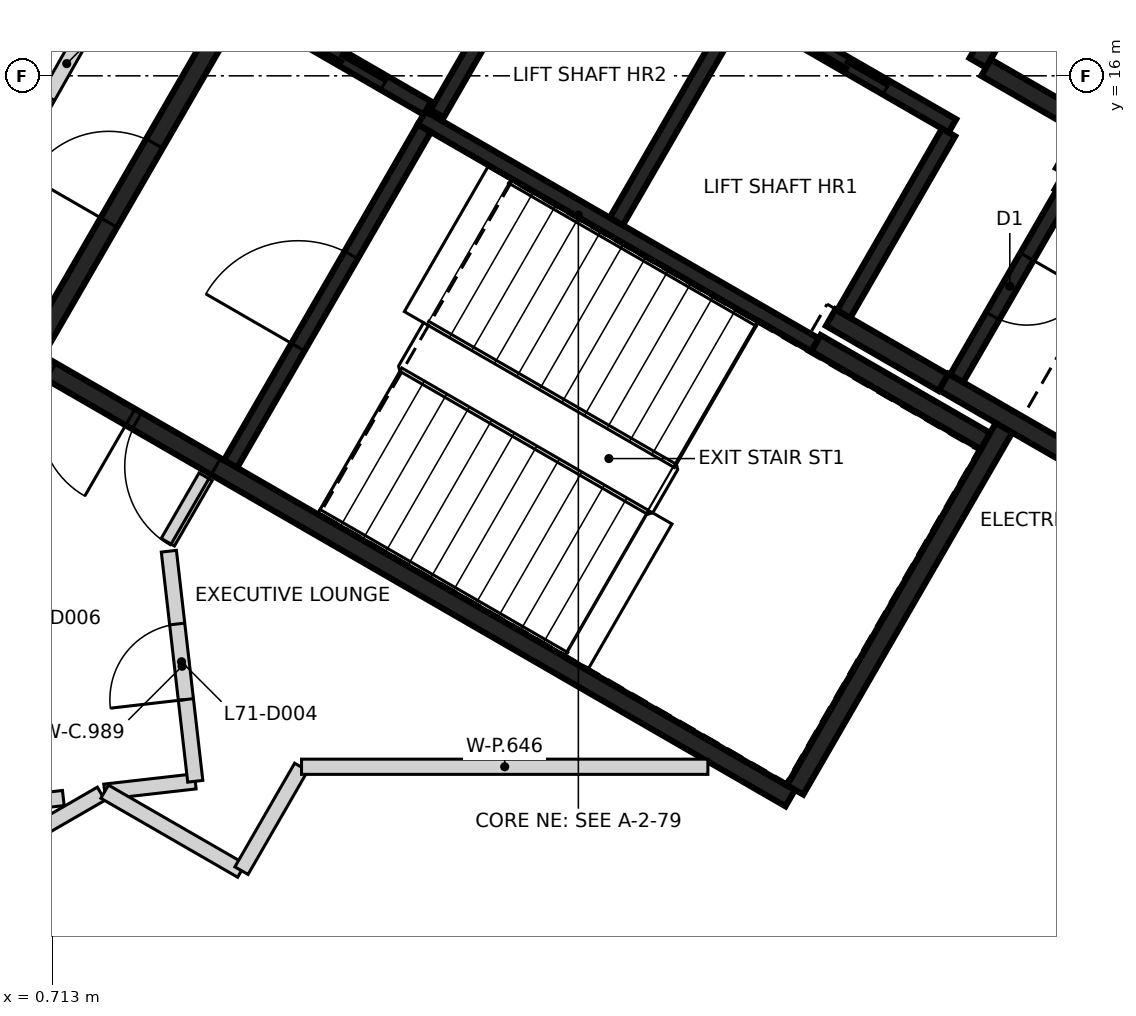
"""IFC4 building model, lengths in metres.
Left out: names, types, materials, properties, quantities, classifications, styles, units other than length and angle.
Written with IfcOpenShell. Run it as: python <this file> out.ifc"""

import sys

from ifc_helpers import new_model, si_unit, direction, frame, frame_2d, origin, place, context, subcontext, project, spatial, rectangle, extrude, element, fill, save


model = new_model("IFC4")
c1 = context("Model", 3, precision=1e-05, world=origin(), true_north=direction((0.0, 1.0)))
c2 = subcontext(c1, "Body", "Model", "MODEL_VIEW")
j1 = project(units=[si_unit("LENGTHUNIT", "METRE"), si_unit("PLANEANGLEUNIT", "RADIAN")], contexts=[c1])
p1 = place(None, origin())
s1 = spatial("IfcSite", under=j1, at=p1, CompositionType="ELEMENT")
p2 = place(p1, origin())
s2 = spatial("IfcBuilding", under=s1, at=p2, CompositionType="ELEMENT")
p3 = place(p2, frame((0.0, 0.0, 280.2)))
s3 = spatial("IfcBuildingStorey", under=s2, at=p3, CompositionType="ELEMENT", Elevation=280.2)
p4 = place(p3, frame((10.42, 6.498, 0.0), z_axis=(0.0, 0.0, 1.0), x_axis=(-0.866021906294, 0.500006057782, 0.0)))
e1 = element("IfcWall", 1, at=p4, inside=s3, PredefinedType="SHEAR", context=c2, shape_type="SweptSolid", body=[
    extrude(rectangle(XDim=11.55, YDim=0.25, at=frame_2d((5.775, 0.0))), origin(), (0.0, 0.0, 1.0), 3.25),
])
p5 = place(p4, frame((10.025, 0.0, 0.0)))
e2 = element("IfcOpeningElement", 2, at=p5, cuts=e1, PredefinedType="OPENING", context=c2, shape_type="SweptSolid", body=[
    extrude(rectangle(XDim=1.2, YDim=2.1, at=frame_2d((0.6, 1.05))), frame((0.0, 0.135, 0.0), z_axis=(0.0, -1.0, 0.0), x_axis=(1.0, 0.0, 0.0)), (0.0, 0.0, 1.0), 0.27),
])
p6 = place(p4, frame((8.725, 0.0, 0.0)))
e3 = element("IfcOpeningElement", 3, at=p6, cuts=e1, PredefinedType="OPENING", context=c2, shape_type="SweptSolid", body=[
    extrude(rectangle(XDim=1.2, YDim=2.1, at=frame_2d((0.6, 1.05))), frame((0.0, 0.135, 0.0), z_axis=(0.0, -1.0, 0.0), x_axis=(1.0, 0.0, 0.0)), (0.0, 0.0, 1.0), 0.27),
])
p7 = place(p3, frame((0.48, 12.381, 0.0), z_axis=(0.0, 0.0, 1.0), x_axis=(0.49999885962, 0.866026062182, 0.0)))
e4 = element("IfcWall", 4, at=p7, inside=s3, PredefinedType="SHEAR", context=c2, shape_type="SweptSolid", body=[
    extrude(rectangle(XDim=5.225, YDim=0.25, at=frame_2d((2.612, 0.0))), origin(), (0.0, 0.0, 1.0), 3.25),
])
p8 = place(p7, frame((1.95, 0.0, 0.0)))
e5 = element("IfcOpeningElement", 5, at=p8, cuts=e4, PredefinedType="OPENING", context=c2, shape_type="SweptSolid", body=[
    extrude(rectangle(XDim=1.2, YDim=2.1, at=frame_2d((0.6, 1.05))), frame((0.0, 0.135, 0.0), z_axis=(0.0, -1.0, 0.0), x_axis=(1.0, 0.0, 0.0)), (0.0, 0.0, 1.0), 0.27),
])
p9 = place(p3, frame((13.238, 11.378, 0.0), z_axis=(0.0, 0.0, 1.0), x_axis=(-0.500008851346, -0.866020293397, 0.0)))
e6 = element("IfcWall", 6, at=p9, inside=s3, PredefinedType="SHEAR", context=c2, shape_type="SweptSolid", body=[
    extrude(rectangle(XDim=5.51, YDim=0.25, at=frame_2d((2.755, 0.0))), origin(), (0.0, 0.0, 1.0), 3.25),
])
p10 = place(p3, frame((14.918, 10.54, 0.0), z_axis=(0.0, 0.0, 1.0), x_axis=(-0.866063538972, 0.499933942099, 0.0)))
e7 = element("IfcWall", 7, at=p10, inside=s3, PredefinedType="SHEAR", context=c2, shape_type="SweptSolid", body=[
    extrude(rectangle(XDim=2.865, YDim=0.25, at=frame_2d((1.432, 0.0))), origin(), (0.0, 0.0, 1.0), 3.25),
])
p11 = place(p3, frame((13.963, 14.614, 0.0), z_axis=(0.0, 0.0, 1.0), x_axis=(0.866042235819, -0.499970844928, 0.0)))
e8 = element("IfcWall", 8, at=p11, inside=s3, PredefinedType="SHEAR", context=c2, shape_type="SweptSolid", body=[
    extrude(rectangle(XDim=2.865, YDim=0.25, at=frame_2d((1.432, 0.0))), origin(), (0.0, 0.0, 1.0), 3.25),
])
p12 = place(p3, frame((10.757, 12.481, 0.0), z_axis=(0.0, 0.0, 1.0), x_axis=(0.866022940537, -0.500004266446, 0.0)))
e9 = element("IfcWall", 9, at=p12, inside=s3, PredefinedType="SHEAR", context=c2, shape_type="SweptSolid", body=[
    extrude(rectangle(XDim=2.575, YDim=0.25, at=frame_2d((1.287, 0.0))), origin(), (0.0, 0.0, 1.0), 3.25),
])
p13 = place(p3, frame((13.819, 17.785, 0.0), z_axis=(0.0, 0.0, 1.0), x_axis=(-0.500039802285, -0.866002422705, 0.0)))
e10 = element("IfcWall", 10, at=p13, inside=s3, PredefinedType="SHEAR", context=c2, shape_type="SweptSolid", body=[
    extrude(rectangle(XDim=1.865, YDim=0.25, at=frame_2d((0.932, 0.0))), origin(), (0.0, 0.0, 1.0), 3.25),
])
p14 = place(p3, frame((12.433, 11.964, 0.0), z_axis=(0.0, 0.0, 1.0), x_axis=(-0.866038183914, 0.499977863513, 0.0)))
e11 = element("IfcWall", 11, at=p14, inside=s3, PredefinedType="SHEAR", context=c2, shape_type="SweptSolid", body=[
    extrude(rectangle(XDim=1.71, YDim=0.25, at=frame_2d((0.855, 0.0))), origin(), (0.0, 0.0, 1.0), 3.25),
])
p15 = place(p3, frame((12.995, 16.108, 0.0), z_axis=(0.0, 0.0, 1.0), x_axis=(0.866044474677, -0.49996696679, 0.0)))
e12 = element("IfcWall", 12, at=p15, inside=s3, PredefinedType="SHEAR", context=c2, shape_type="SweptSolid", body=[
    extrude(rectangle(XDim=1.584, YDim=0.25, at=frame_2d((0.792, 0.0))), origin(), (0.0, 0.0, 1.0), 3.25),
])
p16 = place(p3, frame((14.305, 15.207, 0.0), z_axis=(0.0, 0.0, 1.0), x_axis=(-0.499848422343, -0.866112899501, 0.0)))
e13 = element("IfcWall", 13, at=p16, inside=s3, PredefinedType="SHEAR", context=c2, shape_type="SweptSolid", body=[
    extrude(rectangle(XDim=0.559, YDim=0.25, at=frame_2d((0.28, 0.0))), origin(), (0.0, 0.0, 1.0), 3.25),
])
p17 = place(p3, frame((12.552, 15.342, 0.0), z_axis=(0.0, 0.0, 1.0), x_axis=(-0.866030299012, 0.499991521122, 0.0)))
e14 = element("IfcWall", 14, at=p17, inside=s3, PredefinedType="SHEAR", context=c2, shape_type="SweptSolid", body=[
    extrude(rectangle(XDim=6.1, YDim=0.2, at=frame_2d((3.05, 0.0))), origin(), (0.0, 0.0, 1.0), 3.25),
])
p18 = place(p17, frame((1.0, 0.0, 0.0)))
e15 = element("IfcOpeningElement", 15, at=p18, cuts=e14, PredefinedType="OPENING", context=c2, shape_type="SweptSolid", body=[
    extrude(rectangle(XDim=1.2, YDim=2.1, at=frame_2d((0.6, 1.05))), frame((0.0, 0.11, 0.0), z_axis=(0.0, -1.0, 0.0), x_axis=(1.0, 0.0, 0.0)), (0.0, 0.0, 1.0), 0.22),
])
p19 = place(p17, frame((3.982, 0.0, 0.0)))
e16 = element("IfcOpeningElement", 16, at=p19, cuts=e14, PredefinedType="OPENING", context=c2, shape_type="SweptSolid", body=[
    extrude(rectangle(XDim=1.2, YDim=2.1, at=frame_2d((0.6, 1.05))), frame((0.0, 0.11, 0.0), z_axis=(0.0, -1.0, 0.0), x_axis=(1.0, 0.0, 0.0)), (0.0, 0.0, 1.0), 0.22),
])
p20 = place(p3, frame((10.743, 12.46, 0.0), z_axis=(0.0, 0.0, 1.0), x_axis=(-0.866018848283, 0.500011354289, 0.0)))
e17 = element("IfcWall", 17, at=p20, inside=s3, PredefinedType="SHEAR", context=c2, shape_type="SweptSolid", body=[
    extrude(rectangle(XDim=5.974, YDim=0.2, at=frame_2d((2.987, 0.0))), origin(), (0.0, 0.0, 1.0), 3.25),
])
p21 = place(p3, frame((3.057, 10.895, 0.0), z_axis=(0.0, 0.0, 1.0), x_axis=(0.500027839223, 0.866009330205, 0.0)))
e18 = element("IfcWall", 18, at=p21, inside=s3, PredefinedType="SHEAR", context=c2, shape_type="SweptSolid", body=[
    extrude(rectangle(XDim=5.098, YDim=0.2, at=frame_2d((2.549, 0.0))), origin(), (0.0, 0.0, 1.0), 3.25),
])
p22 = place(p21, frame((1.774, 0.0, 0.0)))
e19 = element("IfcOpeningElement", 19, at=p22, cuts=e18, PredefinedType="OPENING", context=c2, shape_type="SweptSolid", body=[
    extrude(rectangle(XDim=1.4, YDim=2.1, at=frame_2d((0.7, 1.05))), frame((0.0, 0.11, 0.0), z_axis=(0.0, -1.0, 0.0), x_axis=(1.0, 0.0, 0.0)), (0.0, 0.0, 1.0), 0.22),
])
p23 = place(p3, frame((8.132, 14.084, 0.0), z_axis=(0.0, 0.0, 1.0), x_axis=(0.500030834389, 0.86600760081, 0.0)))
e20 = element("IfcWall", 20, at=p23, inside=s3, PredefinedType="SHEAR", context=c2, shape_type="SweptSolid", body=[
    extrude(rectangle(XDim=3.198, YDim=0.2, at=frame_2d((1.599, 0.0))), origin(), (0.0, 0.0, 1.0), 3.25),
])
p24 = place(p3, frame((14.008, 14.442, 0.0), z_axis=(0.0, 0.0, 1.0), x_axis=(-0.499986818241, -0.866033014143, 0.0)))
e21 = element("IfcWall", 21, at=p24, inside=s3, PredefinedType="SHEAR", context=c2, shape_type="SweptSolid", body=[
    extrude(rectangle(XDim=2.798, YDim=0.2, at=frame_2d((1.399, 0.0))), origin(), (0.0, 0.0, 1.0), 3.25),
])
p25 = place(p24, frame((0.949, 0.0, 0.0)))
e22 = element("IfcOpeningElement", 22, at=p25, cuts=e21, PredefinedType="OPENING", context=c2, shape_type="SweptSolid", body=[
    extrude(rectangle(XDim=0.9, YDim=2.1, at=frame_2d((0.45, 1.05))), frame((0.0, 0.11, 0.0), z_axis=(0.0, -1.0, 0.0), x_axis=(1.0, 0.0, 0.0)), (0.0, 0.0, 1.0), 0.22),
])
p26 = place(p3, frame((12.502, 15.255, 0.0), z_axis=(0.0, 0.0, 1.0), x_axis=(-0.499965018551, -0.866045599391, 0.0)))
e23 = element("IfcWall", 23, at=p26, inside=s3, PredefinedType="SHEAR", context=c2, shape_type="SweptSolid", body=[
    extrude(rectangle(XDim=2.759, YDim=0.2, at=frame_2d((1.379, 0.0))), origin(), (0.0, 0.0, 1.0), 3.25),
])
p27 = place(p3, frame((7.324, 18.187, 0.0), z_axis=(0.0, 0.0, 1.0), x_axis=(-0.499967891604, -0.866043940782, 0.0)))
e24 = element("IfcWall", 24, at=p27, inside=s3, PredefinedType="SHEAR", context=c2, shape_type="SweptSolid", body=[
    extrude(rectangle(XDim=3.1, YDim=0.2, at=frame_2d((1.55, 0.0))), origin(), (0.0, 0.0, 1.0), 3.25),
])
p28 = place(p3, frame((5.646, 15.576, 0.0), z_axis=(0.0, 0.0, 1.0), x_axis=(-0.866018407898, 0.500012117035, 0.0)))
e25 = element("IfcWall", 25, at=p28, inside=s3, PredefinedType="SHEAR", context=c2, shape_type="SweptSolid", body=[
    extrude(rectangle(XDim=2.651, YDim=0.2, at=frame_2d((1.325, 0.0))), origin(), (0.0, 0.0, 1.0), 3.25),
])
p29 = place(p28, frame((0.652, 0.0, 0.0)))
e26 = element("IfcOpeningElement", 26, at=p29, cuts=e25, PredefinedType="OPENING", context=c2, shape_type="SweptSolid", body=[
    extrude(rectangle(XDim=1.3, YDim=2.1, at=frame_2d((0.65, 1.05))), frame((0.0, 0.11, 0.0), z_axis=(0.0, -1.0, 0.0), x_axis=(1.0, 0.0, 0.0)), (0.0, 0.0, 1.0), 0.22),
])
p30 = place(p3, frame((-6.4, 2.079, 0.0), z_axis=(0.0, 0.0, 1.0), x_axis=(0.866044821263, 0.499966366432, 0.0)))
e27 = element("IfcWall", 27, at=p30, inside=s3, PredefinedType="PARTITIONING", context=c2, shape_type="SweptSolid", body=[
    extrude(rectangle(XDim=8.953, YDim=0.2, at=frame_2d((4.477, 0.0))), origin(), (0.0, 0.0, 1.0), 3.25),
])
p31 = place(p30, frame((4.003, 0.0, 0.0)))
e28 = element("IfcOpeningElement", 28, at=p31, cuts=e27, PredefinedType="OPENING", context=c2, shape_type="SweptSolid", body=[
    extrude(rectangle(XDim=1.0, YDim=2.1, at=frame_2d((0.5, 1.05))), frame((0.0, 0.11, 0.0), z_axis=(0.0, -1.0, 0.0), x_axis=(1.0, 0.0, 0.0)), (0.0, 0.0, 1.0), 0.22),
])
p32 = place(p3, frame((-1.086, 12.65, 0.0), z_axis=(0.0, 0.0, 1.0), x_axis=(0.492563383526, 0.870276572826, 0.0)))
e29 = element("IfcWall", 29, at=p32, inside=s3, PredefinedType="PARTITIONING", context=c2, shape_type="SweptSolid", body=[
    extrude(rectangle(XDim=6.309, YDim=0.2, at=frame_2d((3.155, 0.0))), origin(), (0.0, 0.0, 1.0), 3.25),
])
p33 = place(p32, frame((3.533, 0.0, 0.0)))
e30 = element("IfcOpeningElement", 30, at=p33, cuts=e29, PredefinedType="OPENING", context=c2, shape_type="SweptSolid", body=[
    extrude(rectangle(XDim=1.0, YDim=2.1, at=frame_2d((0.5, 1.05))), frame((0.0, 0.11, 0.0), z_axis=(0.0, -1.0, 0.0), x_axis=(1.0, 0.0, 0.0)), (0.0, 0.0, 1.0), 0.22),
])
p34 = place(p3, frame((0.286, 6.434, 0.0), z_axis=(0.0, 0.0, 1.0), x_axis=(0.993674480486, 0.112298828274, 0.0)))
e31 = element("IfcWall", 31, at=p34, inside=s3, PredefinedType="PARTITIONING", context=c2, shape_type="SweptSolid", body=[
    extrude(rectangle(XDim=0.574, YDim=0.2, at=frame_2d((0.287, 0.0))), origin(), (0.0, 0.0, 1.0), 3.25),
])
p35 = place(p3, frame((1.4, 6.582, 0.0), z_axis=(0.0, 0.0, 1.0), x_axis=(0.993556915844, 0.11333426216, 0.0)))
e32 = element("IfcWall", 32, at=p35, inside=s3, PredefinedType="PARTITIONING", context=c2, shape_type="SweptSolid", body=[
    extrude(rectangle(XDim=1.2, YDim=0.2, at=frame_2d((0.6, 0.0))), origin(), (0.0, 0.0, 1.0), 3.25),
])
p36 = place(p3, frame((1.4, 6.582, 0.0), z_axis=(0.0, 0.0, 1.0), x_axis=(0.866066271601, -0.499929208183, 0.0)))
e33 = element("IfcWall", 33, at=p36, inside=s3, PredefinedType="PARTITIONING", context=c2, shape_type="SweptSolid", body=[
    extrude(rectangle(XDim=2.078, YDim=0.2, at=frame_2d((1.039, 0.0))), origin(), (0.0, 0.0, 1.0), 3.25),
])
p37 = place(p3, frame((2.592, 6.719, 0.0), z_axis=(0.0, 0.0, 1.0), x_axis=(-0.114027951455, 0.993477541914, 0.0)))
e34 = element("IfcWall", 34, at=p37, inside=s3, PredefinedType="PARTITIONING", context=c2, shape_type="SweptSolid", body=[
    extrude(rectangle(XDim=3.047, YDim=0.2, at=frame_2d((1.523, 0.0))), origin(), (0.0, 0.0, 1.0), 3.25),
])
p38 = place(p37, frame((1.083, 0.0, 0.0)))
e35 = element("IfcOpeningElement", 35, at=p38, cuts=e34, PredefinedType="OPENING", context=c2, shape_type="SweptSolid", body=[
    extrude(rectangle(XDim=1.0, YDim=2.1, at=frame_2d((0.5, 1.05))), frame((0.0, 0.11, 0.0), z_axis=(0.0, -1.0, 0.0), x_axis=(1.0, 0.0, 0.0)), (0.0, 0.0, 1.0), 0.22),
])
p39 = place(p3, frame((2.231, 9.864, 0.0), z_axis=(0.0, 0.0, 1.0), x_axis=(0.499942098031, 0.866058830921, 0.0)))
e36 = element("IfcWall", 36, at=p39, inside=s3, PredefinedType="PARTITIONING", context=c2, shape_type="SweptSolid", body=[
    extrude(rectangle(XDim=0.994, YDim=0.2, at=frame_2d((0.497, 0.0))), origin(), (0.0, 0.0, 1.0), 3.25),
])
p40 = place(p3, frame((3.2, 5.543, 0.0), z_axis=(0.0, 0.0, 1.0), x_axis=(0.499342032259, 0.86640494852, 0.0)))
e37 = element("IfcWall", 37, at=p40, inside=s3, PredefinedType="PARTITIONING", context=c2, shape_type="SweptSolid", body=[
    extrude(rectangle(XDim=1.574, YDim=0.2, at=frame_2d((0.787, 0.0))), origin(), (0.0, 0.0, 1.0), 3.25),
])
p41 = place(p3, frame((3.99, 6.91, 0.0), z_axis=(0.0, 0.0, 1.0), x_axis=(1.0, 0.0, 0.0)))
e38 = element("IfcWall", 38, at=p41, inside=s3, PredefinedType="PARTITIONING", context=c2, shape_type="SweptSolid", body=[
    extrude(rectangle(XDim=5.346, YDim=0.2, at=frame_2d((2.673, 0.0))), origin(), (0.0, 0.0, 1.0), 3.25),
])
p42 = place(p29, origin())
e39 = element("IfcDoor", 39, at=p42, inside=s3, OperationType="SLIDING_TO_LEFT", PredefinedType="DOOR", context=c2, shape_type="SweptSolid", body=[
    extrude(rectangle(XDim=1.3, YDim=2.1, at=frame_2d((0.65, 1.05))), frame((0.0, 0.025, 0.0), z_axis=(0.0, -1.0, 0.0), x_axis=(1.0, 0.0, 0.0)), (0.0, 0.0, 1.0), 0.05),
])
fill(e26, e39)
p43 = place(p18, origin())
e40 = element("IfcDoor", 40, at=p43, inside=s3, OperationType="DOUBLE_DOOR_SLIDING", PredefinedType="DOOR", context=c2, shape_type="SweptSolid", body=[
    extrude(rectangle(XDim=1.2, YDim=2.1, at=frame_2d((0.6, 1.05))), frame((0.0, 0.025, 0.0), z_axis=(0.0, -1.0, 0.0), x_axis=(1.0, 0.0, 0.0)), (0.0, 0.0, 1.0), 0.05),
])
fill(e15, e40)
p44 = place(p5, origin())
e41 = element("IfcDoor", 41, at=p44, inside=s3, OperationType="SINGLE_SWING_LEFT", PredefinedType="DOOR", context=c2, shape_type="SweptSolid", body=[
    extrude(rectangle(XDim=1.2, YDim=2.1, at=frame_2d((0.6, 1.05))), frame((0.0, 0.025, 0.0), z_axis=(0.0, -1.0, 0.0), x_axis=(1.0, 0.0, 0.0)), (0.0, 0.0, 1.0), 0.05),
])
fill(e2, e41)
p45 = place(p6, origin())
e42 = element("IfcDoor", 42, at=p45, inside=s3, OperationType="SINGLE_SWING_RIGHT", PredefinedType="DOOR", context=c2, shape_type="SweptSolid", body=[
    extrude(rectangle(XDim=1.2, YDim=2.1, at=frame_2d((0.6, 1.05))), frame((0.0, 0.025, 0.0), z_axis=(0.0, -1.0, 0.0), x_axis=(1.0, 0.0, 0.0)), (0.0, 0.0, 1.0), 0.05),
])
fill(e3, e42)
p46 = place(p22, origin())
e43 = element("IfcDoor", 43, at=p46, inside=s3, OperationType="SINGLE_SWING_LEFT", PredefinedType="DOOR", context=c2, shape_type="SweptSolid", body=[
    extrude(rectangle(XDim=1.4, YDim=2.1, at=frame_2d((0.7, 1.05))), frame((0.0, 0.025, 0.0), z_axis=(0.0, -1.0, 0.0), x_axis=(1.0, 0.0, 0.0)), (0.0, 0.0, 1.0), 0.05),
])
fill(e19, e43)
p47 = place(p25, origin())
e44 = element("IfcDoor", 44, at=p47, inside=s3, OperationType="SINGLE_SWING_RIGHT", PredefinedType="DOOR", context=c2, shape_type="SweptSolid", body=[
    extrude(rectangle(XDim=0.9, YDim=2.1, at=frame_2d((0.45, 1.05))), frame((0.0, 0.025, 0.0), z_axis=(0.0, -1.0, 0.0), x_axis=(1.0, 0.0, 0.0)), (0.0, 0.0, 1.0), 0.05),
])
fill(e22, e44)
p48 = place(p8, origin())
e45 = element("IfcDoor", 45, at=p48, inside=s3, OperationType="SINGLE_SWING_RIGHT", PredefinedType="DOOR", context=c2, shape_type="SweptSolid", body=[
    extrude(rectangle(XDim=1.2, YDim=2.1, at=frame_2d((0.6, 1.05))), frame((0.0, 0.025, 0.0), z_axis=(0.0, -1.0, 0.0), x_axis=(1.0, 0.0, 0.0)), (0.0, 0.0, 1.0), 0.05),
])
fill(e5, e45)
p49 = place(p38, origin())
e46 = element("IfcDoor", 46, at=p49, inside=s3, OperationType="SINGLE_SWING_LEFT", PredefinedType="DOOR", context=c2, shape_type="SweptSolid", body=[
    extrude(rectangle(XDim=1.0, YDim=2.1, at=frame_2d((0.5, 1.05))), frame((0.0, 0.025, 0.0), z_axis=(0.0, -1.0, 0.0), x_axis=(1.0, 0.0, 0.0)), (0.0, 0.0, 1.0), 0.05),
])
fill(e35, e46)
p50 = place(p33, frame((1.0, 0.0, 0.0), z_axis=(0.0, 0.0, 1.0), x_axis=(-1.0, 0.0, 0.0)))
e47 = element("IfcDoor", 47, at=p50, inside=s3, OperationType="SINGLE_SWING_LEFT", PredefinedType="DOOR", context=c2, shape_type="SweptSolid", body=[
    extrude(rectangle(XDim=1.0, YDim=2.1, at=frame_2d((0.5, 1.05))), frame((0.0, 0.025, 0.0), z_axis=(0.0, -1.0, 0.0), x_axis=(1.0, 0.0, 0.0)), (0.0, 0.0, 1.0), 0.05),
])
fill(e30, e47)
save(model, sys.argv[1])
